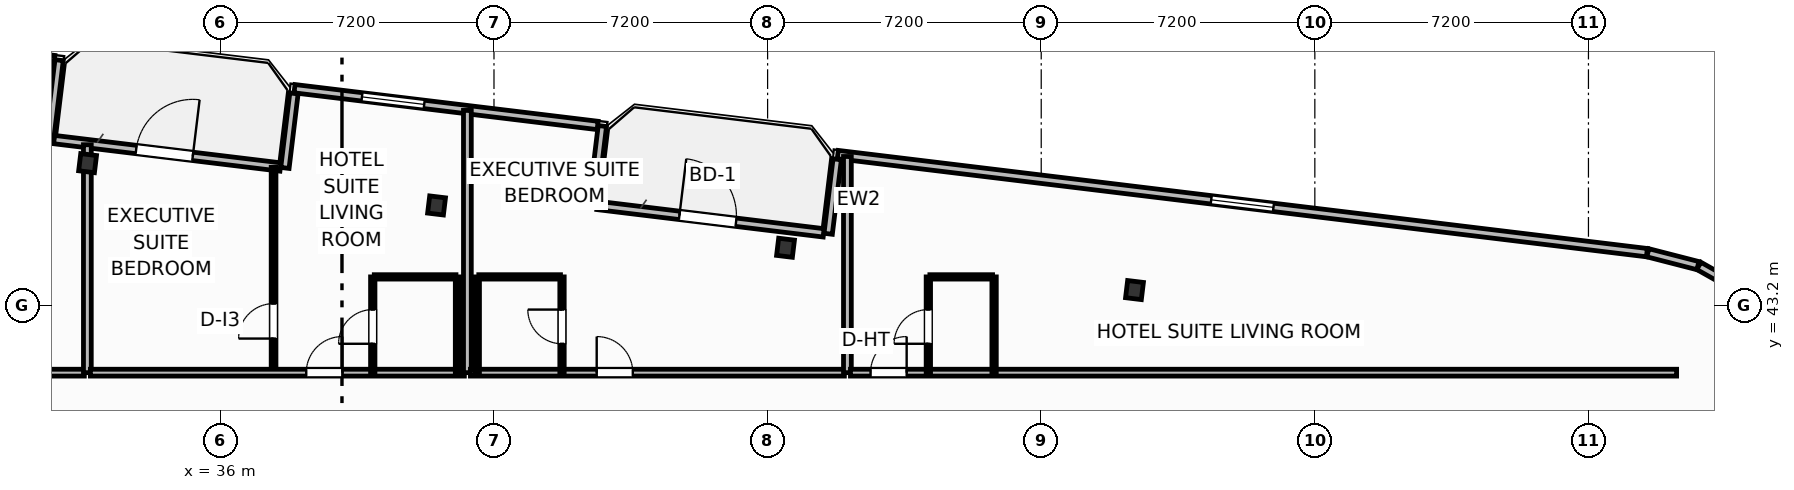
"""IFC4 building model, lengths in metres.
Left out: names, types, materials, properties, quantities, classifications, styles, units other than length and angle.
Written with IfcOpenShell. Run it as: python <this file> out.ifc"""

import sys

from ifc_helpers import new_model, si_unit, direction, frame, frame_2d, origin, origin_2d, place, context, subcontext, project, spatial, rectangle, i_section, extrude, element, fill, save


model = new_model("IFC4")
c1 = context("Model", 3, precision=1e-05, world=origin(), true_north=direction((0.0, 1.0)))
c2 = subcontext(c1, "Body", "Model", "MODEL_VIEW")
j1 = project(units=[si_unit("LENGTHUNIT", "METRE"), si_unit("PLANEANGLEUNIT", "RADIAN")], contexts=[c1])
p1 = place(None, origin())
s1 = spatial("IfcSite", under=j1, at=p1, CompositionType="ELEMENT")
p2 = place(p1, origin())
s2 = spatial("IfcBuilding", under=s1, at=p2, CompositionType="ELEMENT")
p3 = place(p2, frame((0.0, 0.0, 121.7)))
s3 = spatial("IfcBuildingStorey", under=s2, at=p3, CompositionType="ELEMENT", Elevation=121.7)
for number, where, z_axis, x_axis in (
    (1, (60.054, 43.603, 0.0), (0.0, 0.0, 1.0), (0.993, -0.12, 0.0)),
    (2, (50.872, 44.717, 0.0), (0.0, 0.0, 1.0), (0.993, -0.12, 0.0)),
    (3, (41.689, 45.83, 0.0), (0.0, 0.0, 1.0), (0.993, -0.12, 0.0)),
    (4, (32.506, 46.943, 0.0), (0.0, 0.0, 1.0), (0.993, -0.12, 0.0)),
):
    element("IfcColumn", number, at=place(p3, frame(where, z_axis=z_axis, x_axis=x_axis)), inside=s3, PredefinedType="COLUMN", context=c2, shape_type="SweptSolid", body=[
        extrude(i_section(OverallWidth=0.418, OverallDepth=0.455, WebThickness=0.042, FlangeThickness=0.068, FilletRadius=0.025, at=origin_2d()), origin(), (0.0, 0.0, 1.0), 3.7),
    ])
p4 = place(p3, frame((31.624, 47.563, 0.0), z_axis=(0.0, 0.0, 1.0), x_axis=(0.992729951822, -0.120362962556, 0.0)))
e5 = element("IfcWall", 5, at=p4, inside=s3, PredefinedType="SOLIDWALL", context=c2, shape_type="SweptSolid", body=[
    extrude(rectangle(XDim=6.0, YDim=0.22, at=frame_2d((3.0, 0.0))), origin(), (0.0, 0.0, 1.0), 2.73),
])
p5 = place(p4, frame((2.176, 0.0, 0.0)))
e6 = element("IfcOpeningElement", 6, at=p5, cuts=e5, PredefinedType="OPENING", context=c2, shape_type="SweptSolid", body=[
    extrude(rectangle(XDim=1.5, YDim=2.25, at=frame_2d((0.75, 1.125))), frame((0.0, 0.12, 0.0), z_axis=(0.0, -1.0, 0.0), x_axis=(1.0, 0.0, 0.0)), (0.0, 0.0, 1.0), 0.24),
])
p6 = place(p3, frame((45.92, 45.831, 0.0), z_axis=(0.0, 0.0, 1.0), x_axis=(0.992729951822, -0.120362962556, 0.0)))
e7 = element("IfcWall", 7, at=p6, inside=s3, PredefinedType="SOLIDWALL", context=c2, shape_type="SweptSolid", body=[
    extrude(rectangle(XDim=6.0, YDim=0.22, at=frame_2d((3.0, 0.0))), origin(), (0.0, 0.0, 1.0), 2.73),
])
p7 = place(p6, frame((2.176, 0.0, 0.0)))
e8 = element("IfcOpeningElement", 8, at=p7, cuts=e7, PredefinedType="OPENING", context=c2, shape_type="SweptSolid", body=[
    extrude(rectangle(XDim=1.5, YDim=2.25, at=frame_2d((0.75, 1.125))), frame((0.0, 0.12, 0.0), z_axis=(0.0, -1.0, 0.0), x_axis=(1.0, 0.0, 0.0)), (0.0, 0.0, 1.0), 0.24),
])
p8 = place(p3, frame((76.084, 43.575, 0.0), z_axis=(0.0, 0.0, 1.0), x_axis=(-0.871093268227, 0.491117621399, 0.0)))
e9 = element("IfcWall", 9, at=p8, inside=s3, PredefinedType="SOLIDWALL", context=c2, shape_type="SweptSolid", body=[
    extrude(rectangle(XDim=1.353, YDim=0.22, at=frame_2d((0.677, 0.0))), origin(), (0.0, 0.0, 1.0), 2.73),
])
p9 = place(p3, frame((74.881, 44.246, 0.0), z_axis=(0.0, 0.0, 1.0), x_axis=(-0.968549775063, 0.248819881091, 0.0)))
e10 = element("IfcWall", 10, at=p9, inside=s3, PredefinedType="SOLIDWALL", context=c2, shape_type="SweptSolid", body=[
    extrude(rectangle(XDim=1.361, YDim=0.22, at=frame_2d((0.68, 0.0))), origin(), (0.0, 0.0, 1.0), 2.73),
])
p10 = place(p3, frame((73.538, 44.588, 0.0), z_axis=(0.0, 0.0, 1.0), x_axis=(-0.992733493583, 0.120333747213, 0.0)))
e11 = element("IfcWall", 11, at=p10, inside=s3, PredefinedType="SOLIDWALL", context=c2, shape_type="SweptSolid", body=[
    extrude(rectangle(XDim=21.447, YDim=0.22, at=frame_2d((10.724, 0.0))), origin(), (0.0, 0.0, 1.0), 2.73),
])
p11 = place(p10, frame((9.899, 0.0, 0.8)))
e12 = element("IfcOpeningElement", 12, at=p11, cuts=e11, PredefinedType="OPENING", context=c2, shape_type="SweptSolid", body=[
    extrude(rectangle(XDim=1.65, YDim=1.65, at=frame_2d((0.825, 0.825))), frame((0.0, 0.12, 0.0), z_axis=(0.0, -1.0, 0.0), x_axis=(1.0, 0.0, 0.0)), (0.0, 0.0, 1.0), 0.24),
])
p12 = place(p3, frame((52.231, 47.045, 0.0), z_axis=(0.0, 0.0, 1.0), x_axis=(-0.120275992932, -0.992740492538, 0.0)))
e13 = element("IfcWall", 13, at=p12, inside=s3, PredefinedType="SOLIDWALL", context=c2, shape_type="SweptSolid", body=[
    extrude(rectangle(XDim=1.975, YDim=0.22, at=frame_2d((0.988, 0.0))), origin(), (0.0, 0.0, 1.0), 2.73),
])
p13 = place(p3, frame((45.799, 45.835, 0.0), z_axis=(0.0, 0.0, 1.0), x_axis=(0.120314009587, 0.992735885871, 0.0)))
e14 = element("IfcWall", 14, at=p13, inside=s3, PredefinedType="SOLIDWALL", context=c2, shape_type="SweptSolid", body=[
    extrude(rectangle(XDim=2.1, YDim=0.22, at=frame_2d((1.05, 0.0))), origin(), (0.0, 0.0, 1.0), 2.73),
])
p14 = place(p3, frame((45.928, 47.935, 0.0), z_axis=(0.0, 0.0, 1.0), x_axis=(-0.992730591876, 0.120357683402, 0.0)))
e15 = element("IfcWall", 15, at=p14, inside=s3, PredefinedType="SOLIDWALL", context=c2, shape_type="SweptSolid", body=[
    extrude(rectangle(XDim=8.035, YDim=0.22, at=frame_2d((4.017, 0.0))), origin(), (0.0, 0.0, 1.0), 2.73),
])
p15 = place(p14, frame((4.597, 0.0, 0.8)))
e16 = element("IfcOpeningElement", 16, at=p15, cuts=e15, PredefinedType="OPENING", context=c2, shape_type="SweptSolid", body=[
    extrude(rectangle(XDim=1.65, YDim=1.65, at=frame_2d((0.825, 0.825))), frame((0.0, 0.12, 0.0), z_axis=(0.0, -1.0, 0.0), x_axis=(1.0, 0.0, 0.0)), (0.0, 0.0, 1.0), 0.24),
])
p16 = place(p3, frame((37.936, 48.778, 0.0), z_axis=(0.0, 0.0, 1.0), x_axis=(-0.120397815541, -0.992725725472, 0.0)))
e17 = element("IfcWall", 17, at=p16, inside=s3, PredefinedType="SOLIDWALL", context=c2, shape_type="SweptSolid", body=[
    extrude(rectangle(XDim=1.975, YDim=0.22, at=frame_2d((0.988, 0.0))), origin(), (0.0, 0.0, 1.0), 2.73),
])
p17 = place(p3, frame((31.504, 47.568, 0.0), z_axis=(0.0, 0.0, 1.0), x_axis=(0.120341784665, 0.992732519294, 0.0)))
e18 = element("IfcWall", 18, at=p17, inside=s3, PredefinedType="SOLIDWALL", context=c2, shape_type="SweptSolid", body=[
    extrude(rectangle(XDim=2.1, YDim=0.22, at=frame_2d((1.05, 0.0))), origin(), (0.0, 0.0, 1.0), 2.73),
])
p18 = place(p3, frame((31.633, 49.668, 0.0), z_axis=(0.0, 0.0, 1.0), x_axis=(-0.992731670483, 0.120348786531, 0.0)))
e19 = element("IfcWall", 19, at=p18, inside=s3, PredefinedType="SOLIDWALL", context=c2, shape_type="SweptSolid", body=[
    extrude(rectangle(XDim=21.347, YDim=0.22, at=frame_2d((10.674, 0.0))), origin(), (0.0, 0.0, 1.0), 2.73),
])
p19 = place(p18, frame((9.849, 0.0, 0.8)))
e20 = element("IfcOpeningElement", 20, at=p19, cuts=e19, PredefinedType="OPENING", context=c2, shape_type="SweptSolid", body=[
    extrude(rectangle(XDim=1.65, YDim=1.65, at=frame_2d((0.825, 0.825))), frame((0.0, 0.12, 0.0), z_axis=(0.0, -1.0, 0.0), x_axis=(1.0, 0.0, 0.0)), (0.0, 0.0, 1.0), 0.24),
])
p20 = place(p3, frame((3.864, 41.43, 0.0), z_axis=(0.0, 0.0, 1.0), x_axis=(1.0, 0.0, 0.0)))
e21 = element("IfcWall", 21, at=p20, inside=s3, PredefinedType="PARTITIONING", context=c2, shape_type="SweptSolid", body=[
    extrude(rectangle(XDim=28.556, YDim=0.18, at=frame_2d((14.278, 0.0))), origin(), (0.0, 0.0, 1.0), 3.45),
])
p21 = place(p20, frame((21.409, 0.0, 0.0)))
e22 = element("IfcOpeningElement", 22, at=p21, cuts=e21, PredefinedType="OPENING", context=c2, shape_type="SweptSolid", body=[
    extrude(rectangle(XDim=0.95, YDim=2.15, at=frame_2d((0.475, 1.075))), frame((0.0, 0.1, 0.0), z_axis=(0.0, -1.0, 0.0), x_axis=(1.0, 0.0, 0.0)), (0.0, 0.0, 1.0), 0.2),
])
p22 = place(p3, frame((32.5, 41.43, 0.0), z_axis=(0.0, 0.0, 1.0), x_axis=(0.0, 1.0, 0.0)))
e23 = element("IfcWall", 23, at=p22, inside=s3, PredefinedType="PARTITIONING", context=c2, shape_type="SweptSolid", body=[
    extrude(rectangle(XDim=5.997, YDim=0.205, at=frame_2d((2.999, 0.0))), origin(), (0.0, 0.0, 1.0), 2.662),
])
p23 = place(p3, frame((37.4, 41.43, 0.0), z_axis=(0.0, 0.0, 1.0), x_axis=(0.0, 1.0, 0.0)))
e24 = element("IfcWall", 24, at=p23, inside=s3, PredefinedType="PARTITIONING", context=c2, shape_type="SweptSolid", body=[
    extrude(rectangle(XDim=5.403, YDim=0.125, at=frame_2d((2.702, 0.0))), origin(), (0.0, 0.0, 1.0), 3.45),
])
p24 = place(p23, frame((0.897, 0.0, 0.0)))
e25 = element("IfcOpeningElement", 25, at=p24, cuts=e24, PredefinedType="OPENING", context=c2, shape_type="SweptSolid", body=[
    extrude(rectangle(XDim=0.92, YDim=2.05, at=frame_2d((0.46, 1.025))), frame((0.0, 0.073, 0.0), z_axis=(0.0, -1.0, 0.0), x_axis=(1.0, 0.0, 0.0)), (0.0, 0.0, 1.0), 0.145),
])
p25 = place(p3, frame((32.58, 41.43, 0.0), z_axis=(0.0, 0.0, 1.0), x_axis=(1.0, 0.0, 0.0)))
e26 = element("IfcWall", 26, at=p25, inside=s3, PredefinedType="PARTITIONING", context=c2, shape_type="SweptSolid", body=[
    extrude(rectangle(XDim=9.84, YDim=0.18, at=frame_2d((4.92, 0.0))), origin(), (0.0, 0.0, 1.0), 3.45),
])
p26 = place(p25, frame((5.68, 0.0, 0.0)))
e27 = element("IfcOpeningElement", 27, at=p26, cuts=e26, PredefinedType="OPENING", context=c2, shape_type="SweptSolid", body=[
    extrude(rectangle(XDim=0.95, YDim=2.15, at=frame_2d((0.475, 1.075))), frame((0.0, 0.1, 0.0), z_axis=(0.0, -1.0, 0.0), x_axis=(1.0, 0.0, 0.0)), (0.0, 0.0, 1.0), 0.2),
])
p27 = place(p3, frame((40.05, 43.95, 0.0), z_axis=(0.0, 0.0, 1.0), x_axis=(1.0, 0.0, 0.0)))
e28 = element("IfcWall", 28, at=p27, inside=s3, PredefinedType="PARTITIONING", context=c2, shape_type="SweptSolid", body=[
    extrude(rectangle(XDim=2.15, YDim=0.115, at=frame_2d((1.075, 0.0))), origin(), (0.0, 0.0, 1.0), 3.45),
])
p28 = place(p3, frame((40.01, 41.43, 0.0), z_axis=(0.0, 0.0, 1.0), x_axis=(0.0, 1.0, 0.0)))
e29 = element("IfcWall", 29, at=p28, inside=s3, PredefinedType="PARTITIONING", context=c2, shape_type="SweptSolid", body=[
    extrude(rectangle(XDim=2.52, YDim=0.115, at=frame_2d((1.26, 0.0))), origin(), (0.0, 0.0, 1.0), 3.45),
])
p29 = place(p28, frame((0.76, 0.0, 0.0)))
e30 = element("IfcOpeningElement", 30, at=p29, cuts=e29, PredefinedType="OPENING", context=c2, shape_type="SweptSolid", body=[
    extrude(rectangle(XDim=0.9, YDim=2.05, at=frame_2d((0.45, 1.025))), frame((0.0, 0.067, 0.0), z_axis=(0.0, -1.0, 0.0), x_axis=(1.0, 0.0, 0.0)), (0.0, 0.0, 1.0), 0.135),
])
p30 = place(p3, frame((42.24, 41.43, 0.0), z_axis=(0.0, 0.0, 1.0), x_axis=(0.0, 1.0, 0.0)))
e31 = element("IfcWall", 31, at=p30, inside=s3, PredefinedType="PARTITIONING", context=c2, shape_type="SweptSolid", body=[
    extrude(rectangle(XDim=2.52, YDim=0.115, at=frame_2d((1.26, 0.0))), origin(), (0.0, 0.0, 1.0), 2.662),
])
p31 = place(p3, frame((42.5, 41.43, 0.0), z_axis=(0.0, 0.0, 1.0), x_axis=(0.0, 1.0, 0.0)))
e32 = element("IfcWall", 32, at=p31, inside=s3, PredefinedType="PARTITIONING", context=c2, shape_type="SweptSolid", body=[
    extrude(rectangle(XDim=6.9, YDim=0.205, at=frame_2d((3.45, 0.0))), origin(), (0.0, 0.0, 1.0), 2.662),
])
p32 = place(p3, frame((42.58, 41.43, 0.0), z_axis=(0.0, 0.0, 1.0), x_axis=(1.0, 0.0, 0.0)))
e33 = element("IfcWall", 33, at=p32, inside=s3, PredefinedType="PARTITIONING", context=c2, shape_type="SweptSolid", body=[
    extrude(rectangle(XDim=9.84, YDim=0.18, at=frame_2d((4.92, 0.0))), origin(), (0.0, 0.0, 1.0), 3.45),
])
p33 = place(p32, frame((3.323, 0.0, 0.0)))
e34 = element("IfcOpeningElement", 34, at=p33, cuts=e33, PredefinedType="OPENING", context=c2, shape_type="SweptSolid", body=[
    extrude(rectangle(XDim=0.95, YDim=2.15, at=frame_2d((0.475, 1.075))), frame((0.0, 0.1, 0.0), z_axis=(0.0, -1.0, 0.0), x_axis=(1.0, 0.0, 0.0)), (0.0, 0.0, 1.0), 0.2),
])
p34 = place(p3, frame((42.8, 43.95, 0.0), z_axis=(0.0, 0.0, 1.0), x_axis=(1.0, 0.0, 0.0)))
e35 = element("IfcWall", 35, at=p34, inside=s3, PredefinedType="PARTITIONING", context=c2, shape_type="SweptSolid", body=[
    extrude(rectangle(XDim=2.15, YDim=0.115, at=frame_2d((1.075, 0.0))), origin(), (0.0, 0.0, 1.0), 3.45),
])
p35 = place(p3, frame((44.99, 41.43, 0.0), z_axis=(0.0, 0.0, 1.0), x_axis=(0.0, 1.0, 0.0)))
e36 = element("IfcWall", 36, at=p35, inside=s3, PredefinedType="PARTITIONING", context=c2, shape_type="SweptSolid", body=[
    extrude(rectangle(XDim=2.52, YDim=0.115, at=frame_2d((1.26, 0.0))), origin(), (0.0, 0.0, 1.0), 3.45),
])
p36 = place(p35, frame((0.76, 0.0, 0.0)))
e37 = element("IfcOpeningElement", 37, at=p36, cuts=e36, PredefinedType="OPENING", context=c2, shape_type="SweptSolid", body=[
    extrude(rectangle(XDim=0.9, YDim=2.05, at=frame_2d((0.45, 1.025))), frame((0.0, 0.067, 0.0), z_axis=(0.0, -1.0, 0.0), x_axis=(1.0, 0.0, 0.0)), (0.0, 0.0, 1.0), 0.135),
])
p37 = place(p3, frame((42.76, 41.43, 0.0), z_axis=(0.0, 0.0, 1.0), x_axis=(0.0, 1.0, 0.0)))
e38 = element("IfcWall", 38, at=p37, inside=s3, PredefinedType="PARTITIONING", context=c2, shape_type="SweptSolid", body=[
    extrude(rectangle(XDim=2.52, YDim=0.115, at=frame_2d((1.26, 0.0))), origin(), (0.0, 0.0, 1.0), 2.662),
])
p38 = place(p3, frame((52.5, 41.43, 0.0), z_axis=(0.0, 0.0, 1.0), x_axis=(0.0, 1.0, 0.0)))
e39 = element("IfcWall", 39, at=p38, inside=s3, PredefinedType="PARTITIONING", context=c2, shape_type="SweptSolid", body=[
    extrude(rectangle(XDim=5.688, YDim=0.205, at=frame_2d((2.844, 0.0))), origin(), (0.0, 0.0, 1.0), 3.45),
])
p39 = place(p3, frame((52.58, 41.43, 0.0), z_axis=(0.0, 0.0, 1.0), x_axis=(1.0, 0.0, 0.0)))
e40 = element("IfcWall", 40, at=p39, inside=s3, PredefinedType="PARTITIONING", context=c2, shape_type="SweptSolid", body=[
    extrude(rectangle(XDim=21.74, YDim=0.18, at=frame_2d((10.87, 0.0))), origin(), (0.0, 0.0, 1.0), 3.45),
])
p40 = place(p39, frame((0.529, 0.0, 0.0)))
e41 = element("IfcOpeningElement", 41, at=p40, cuts=e40, PredefinedType="OPENING", context=c2, shape_type="SweptSolid", body=[
    extrude(rectangle(XDim=0.95, YDim=2.15, at=frame_2d((0.475, 1.075))), frame((0.0, 0.1, 0.0), z_axis=(0.0, -1.0, 0.0), x_axis=(1.0, 0.0, 0.0)), (0.0, 0.0, 1.0), 0.2),
])
p41 = place(p3, frame((54.67, 43.95, 0.0), z_axis=(0.0, 0.0, 1.0), x_axis=(1.0, 0.0, 0.0)))
e42 = element("IfcWall", 42, at=p41, inside=s3, PredefinedType="PARTITIONING", context=c2, shape_type="SweptSolid", body=[
    extrude(rectangle(XDim=1.65, YDim=0.115, at=frame_2d((0.825, 0.0))), origin(), (0.0, 0.0, 1.0), 2.824),
])
p42 = place(p3, frame((54.63, 41.43, 0.0), z_axis=(0.0, 0.0, 1.0), x_axis=(0.0, 1.0, 0.0)))
e43 = element("IfcWall", 43, at=p42, inside=s3, PredefinedType="PARTITIONING", context=c2, shape_type="SweptSolid", body=[
    extrude(rectangle(XDim=2.52, YDim=0.115, at=frame_2d((1.26, 0.0))), origin(), (0.0, 0.0, 1.0), 3.45),
])
p43 = place(p42, frame((0.76, 0.0, 0.0)))
e44 = element("IfcOpeningElement", 44, at=p43, cuts=e43, PredefinedType="OPENING", context=c2, shape_type="SweptSolid", body=[
    extrude(rectangle(XDim=0.9, YDim=2.05, at=frame_2d((0.45, 1.025))), frame((0.0, 0.067, 0.0), z_axis=(0.0, -1.0, 0.0), x_axis=(1.0, 0.0, 0.0)), (0.0, 0.0, 1.0), 0.135),
])
p44 = place(p3, frame((56.36, 41.43, 0.0), z_axis=(0.0, 0.0, 1.0), x_axis=(0.0, 1.0, 0.0)))
e45 = element("IfcWall", 45, at=p44, inside=s3, PredefinedType="PARTITIONING", context=c2, shape_type="SweptSolid", body=[
    extrude(rectangle(XDim=2.52, YDim=0.115, at=frame_2d((1.26, 0.0))), origin(), (0.0, 0.0, 1.0), 3.45),
])
p45 = place(p5, origin())
e46 = element("IfcDoor", 46, at=p45, inside=s3, OperationType="SINGLE_SWING_RIGHT", PredefinedType="DOOR", context=c2, shape_type="SweptSolid", body=[
    extrude(rectangle(XDim=1.5, YDim=2.25, at=frame_2d((0.75, 1.125))), frame((0.0, 0.025, 0.0), z_axis=(0.0, -1.0, 0.0), x_axis=(1.0, 0.0, 0.0)), (0.0, 0.0, 1.0), 0.05),
])
fill(e6, e46)
p46 = place(p7, origin())
e47 = element("IfcDoor", 47, at=p46, inside=s3, OperationType="SINGLE_SWING_LEFT", PredefinedType="DOOR", context=c2, shape_type="SweptSolid", body=[
    extrude(rectangle(XDim=1.5, YDim=2.25, at=frame_2d((0.75, 1.125))), frame((0.0, 0.025, 0.0), z_axis=(0.0, -1.0, 0.0), x_axis=(1.0, 0.0, 0.0)), (0.0, 0.0, 1.0), 0.05),
])
fill(e8, e47)
p47 = place(p11, origin())
e48 = element("IfcWindow", 48, at=p47, inside=s3, PartitioningType="SINGLE_PANEL", PredefinedType="WINDOW", context=c2, shape_type="SweptSolid", body=[
    extrude(rectangle(XDim=1.65, YDim=1.65, at=frame_2d((0.825, 0.825))), frame((0.0, 0.03, 0.0), z_axis=(0.0, -1.0, 0.0), x_axis=(1.0, 0.0, 0.0)), (0.0, 0.0, 1.0), 0.06),
])
fill(e12, e48)
p48 = place(p15, origin())
e49 = element("IfcWindow", 49, at=p48, inside=s3, PartitioningType="SINGLE_PANEL", PredefinedType="WINDOW", context=c2, shape_type="SweptSolid", body=[
    extrude(rectangle(XDim=1.65, YDim=1.65, at=frame_2d((0.825, 0.825))), frame((0.0, 0.03, 0.0), z_axis=(0.0, -1.0, 0.0), x_axis=(1.0, 0.0, 0.0)), (0.0, 0.0, 1.0), 0.06),
])
fill(e16, e49)
p49 = place(p24, origin())
e50 = element("IfcDoor", 50, at=p49, inside=s3, OperationType="SINGLE_SWING_LEFT", PredefinedType="DOOR", context=c2, shape_type="SweptSolid", body=[
    extrude(rectangle(XDim=0.92, YDim=2.05, at=frame_2d((0.46, 1.025))), frame((0.0, 0.025, 0.0), z_axis=(0.0, -1.0, 0.0), x_axis=(1.0, 0.0, 0.0)), (0.0, 0.0, 1.0), 0.05),
])
fill(e25, e50)
p50 = place(p26, origin())
e51 = element("IfcDoor", 51, at=p50, inside=s3, OperationType="SINGLE_SWING_RIGHT", PredefinedType="DOOR", context=c2, shape_type="SweptSolid", body=[
    extrude(rectangle(XDim=0.95, YDim=2.15, at=frame_2d((0.475, 1.075))), frame((0.0, 0.025, 0.0), z_axis=(0.0, -1.0, 0.0), x_axis=(1.0, 0.0, 0.0)), (0.0, 0.0, 1.0), 0.05),
])
fill(e27, e51)
p51 = place(p29, origin())
e52 = element("IfcDoor", 52, at=p51, inside=s3, OperationType="SINGLE_SWING_LEFT", PredefinedType="DOOR", context=c2, shape_type="SweptSolid", body=[
    extrude(rectangle(XDim=0.9, YDim=2.05, at=frame_2d((0.45, 1.025))), frame((0.0, 0.025, 0.0), z_axis=(0.0, -1.0, 0.0), x_axis=(1.0, 0.0, 0.0)), (0.0, 0.0, 1.0), 0.05),
])
fill(e30, e52)
p52 = place(p33, origin())
e53 = element("IfcDoor", 53, at=p52, inside=s3, OperationType="SINGLE_SWING_LEFT", PredefinedType="DOOR", context=c2, shape_type="SweptSolid", body=[
    extrude(rectangle(XDim=0.95, YDim=2.15, at=frame_2d((0.475, 1.075))), frame((0.0, 0.025, 0.0), z_axis=(0.0, -1.0, 0.0), x_axis=(1.0, 0.0, 0.0)), (0.0, 0.0, 1.0), 0.05),
])
fill(e34, e53)
p53 = place(p36, origin())
e54 = element("IfcDoor", 54, at=p53, inside=s3, OperationType="SINGLE_SWING_RIGHT", PredefinedType="DOOR", context=c2, shape_type="SweptSolid", body=[
    extrude(rectangle(XDim=0.9, YDim=2.05, at=frame_2d((0.45, 1.025))), frame((0.0, 0.025, 0.0), z_axis=(0.0, -1.0, 0.0), x_axis=(1.0, 0.0, 0.0)), (0.0, 0.0, 1.0), 0.05),
])
fill(e37, e54)
p54 = place(p40, origin())
e55 = element("IfcDoor", 55, at=p54, inside=s3, OperationType="SINGLE_SWING_RIGHT", PredefinedType="DOOR", context=c2, shape_type="SweptSolid", body=[
    extrude(rectangle(XDim=0.95, YDim=2.15, at=frame_2d((0.475, 1.075))), frame((0.0, 0.025, 0.0), z_axis=(0.0, -1.0, 0.0), x_axis=(1.0, 0.0, 0.0)), (0.0, 0.0, 1.0), 0.05),
])
fill(e41, e55)
p55 = place(p43, origin())
e56 = element("IfcDoor", 56, at=p55, inside=s3, OperationType="SINGLE_SWING_LEFT", PredefinedType="DOOR", context=c2, shape_type="SweptSolid", body=[
    extrude(rectangle(XDim=0.9, YDim=2.05, at=frame_2d((0.45, 1.025))), frame((0.0, 0.025, 0.0), z_axis=(0.0, -1.0, 0.0), x_axis=(1.0, 0.0, 0.0)), (0.0, 0.0, 1.0), 0.05),
])
fill(e44, e56)
save(model, sys.argv[1])
